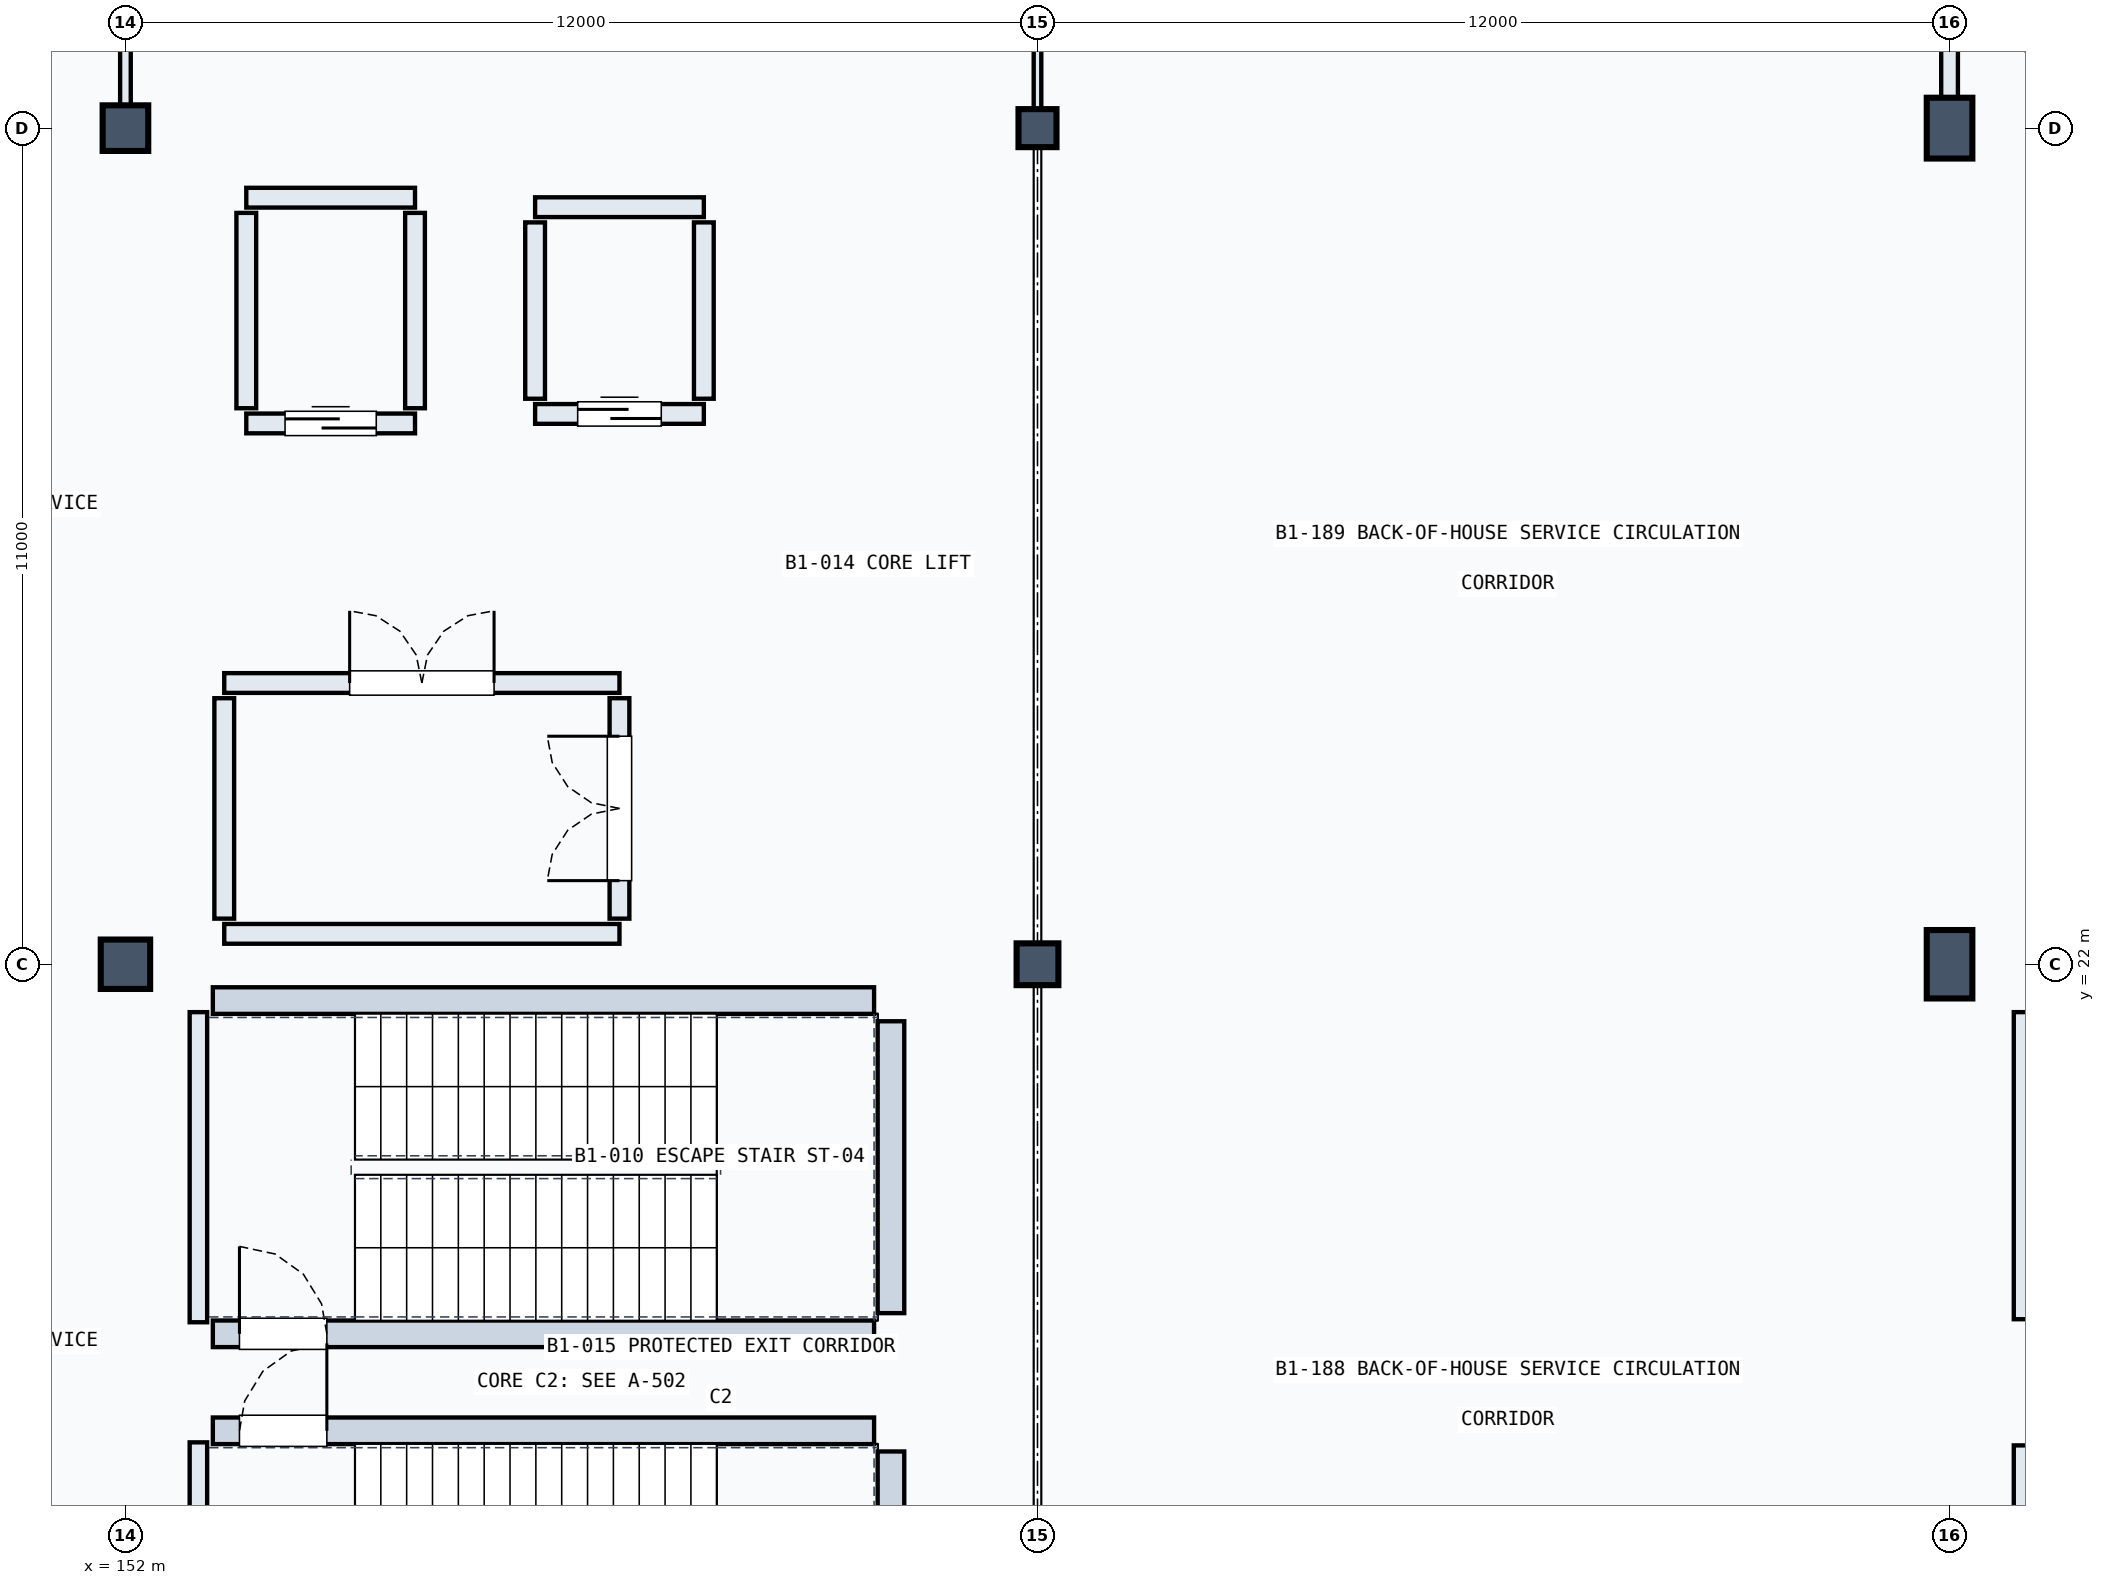
"""IFC4 building model, lengths in metres.
Left out: names, types, materials, properties, quantities, classifications, styles, units other than length and angle.
Written with IfcOpenShell. Run it as: python <this file> out.ifc"""

import sys

from ifc_helpers import new_model, si_unit, direction, frame, frame_2d, origin, origin_2d, place, context, subcontext, project, spatial, rectangle, extrude, element, fill, save


model = new_model("IFC4")
c1 = context("Model", 3, precision=1e-05, world=origin(), true_north=direction((0.0, 1.0)))
c2 = subcontext(c1, "Body", "Model", "MODEL_VIEW")
j1 = project(units=[si_unit("LENGTHUNIT", "METRE"), si_unit("PLANEANGLEUNIT", "RADIAN")], contexts=[c1])
p1 = place(None, origin())
s1 = spatial("IfcSite", under=j1, at=p1, CompositionType="ELEMENT")
p2 = place(p1, origin())
s2 = spatial("IfcBuilding", under=s1, at=p2, CompositionType="ELEMENT")
p3 = place(p2, frame((0.0, 0.0, -5.4)))
s3 = spatial("IfcBuildingStorey", under=s2, at=p3, CompositionType="ELEMENT", Elevation=-5.4)
p4 = place(p3, frame((152.0, 22.0, 0.0), z_axis=(0.0, 0.0, 1.0), x_axis=(1.0, 0.0, 0.0)))
e1 = element("IfcColumn", 1, at=p4, inside=s3, PredefinedType="COLUMN", context=c2, shape_type="SweptSolid", body=[
    extrude(rectangle(XDim=0.65, YDim=0.65, at=origin_2d()), origin(), (0.0, 0.0, 1.0), 5.4),
])
p5 = place(p3, frame((152.0, 33.0, 0.0), z_axis=(0.0, 0.0, 1.0), x_axis=(1.0, 0.0, 0.0)))
e2 = element("IfcColumn", 2, at=p5, inside=s3, PredefinedType="COLUMN", context=c2, shape_type="SweptSolid", body=[
    extrude(rectangle(XDim=0.6, YDim=0.6, at=origin_2d()), origin(), (0.0, 0.0, 1.0), 5.4),
])
p6 = place(p3, frame((164.0, 22.0, 0.0), z_axis=(0.0, 0.0, 1.0), x_axis=(1.0, 0.0, 0.0)))
e3 = element("IfcColumn", 3, at=p6, inside=s3, PredefinedType="COLUMN", context=c2, shape_type="SweptSolid", body=[
    extrude(rectangle(XDim=0.55, YDim=0.55, at=origin_2d()), origin(), (0.0, 0.0, 1.0), 5.4),
])
p7 = place(p3, frame((164.0, 33.0, 0.0), z_axis=(0.0, 0.0, 1.0), x_axis=(1.0, 0.0, 0.0)))
e4 = element("IfcColumn", 4, at=p7, inside=s3, PredefinedType="COLUMN", context=c2, shape_type="SweptSolid", body=[
    extrude(rectangle(XDim=0.5, YDim=0.5, at=origin_2d()), origin(), (0.0, 0.0, 1.0), 5.4),
])
p8 = place(p3, frame((176.0, 22.0, 0.0), z_axis=(0.0, 0.0, 1.0), x_axis=(1.0, 0.0, 0.0)))
e5 = element("IfcColumn", 5, at=p8, inside=s3, PredefinedType="COLUMN", context=c2, shape_type="SweptSolid", body=[
    extrude(rectangle(XDim=0.6, YDim=0.9, at=origin_2d()), origin(), (0.0, 0.0, 1.0), 5.4),
])
p9 = place(p3, frame((176.0, 33.0, 0.0), z_axis=(0.0, 0.0, 1.0), x_axis=(1.0, 0.0, 0.0)))
e6 = element("IfcColumn", 6, at=p9, inside=s3, PredefinedType="COLUMN", context=c2, shape_type="SweptSolid", body=[
    extrude(rectangle(XDim=0.6, YDim=0.8, at=origin_2d()), origin(), (0.0, 0.0, 1.0), 5.4),
])
p10 = place(p3, frame((152.96, 11.63, 0.0), z_axis=(0.0, 0.0, 1.0), x_axis=(0.0, 1.0, 0.0)))
e7 = element("IfcWall", 7, at=p10, inside=s3, PredefinedType="SOLIDWALL", context=c2, shape_type="SweptSolid", body=[
    extrude(rectangle(XDim=4.08, YDim=0.23, at=frame_2d((2.04, 0.0))), origin(), (0.0, 0.0, 1.0), 5.04),
])
p11 = place(p3, frame((162.072, 11.05, 0.0), z_axis=(0.0, 0.0, 1.0), x_axis=(0.0, 1.0, 0.0)))
e8 = element("IfcWall", 8, at=p11, inside=s3, PredefinedType="SOLIDWALL", context=c2, shape_type="SweptSolid", body=[
    extrude(rectangle(XDim=4.54, YDim=0.35, at=frame_2d((2.27, 0.0))), origin(), (0.0, 0.0, 1.0), 5.04),
])
p12 = place(p3, frame((153.15, 15.862, 0.0), z_axis=(0.0, 0.0, 1.0), x_axis=(1.0, 0.0, 0.0)))
e9 = element("IfcWall", 9, at=p12, inside=s3, PredefinedType="SOLIDWALL", context=c2, shape_type="SweptSolid", body=[
    extrude(rectangle(XDim=8.7, YDim=0.35, at=frame_2d((4.35, 0.0))), origin(), (0.0, 0.0, 1.0), 5.04),
])
p13 = place(p12, frame((0.35, 0.0, 0.0)))
e10 = element("IfcOpeningElement", 10, at=p13, cuts=e9, PredefinedType="OPENING", context=c2, shape_type="SweptSolid", body=[
    extrude(rectangle(XDim=1.15, YDim=2.2, at=frame_2d((0.575, 1.1))), frame((0.0, 0.185, 0.0), z_axis=(0.0, -1.0, 0.0), x_axis=(1.0, 0.0, 0.0)), (0.0, 0.0, 1.0), 0.37),
])
p14 = place(p3, frame((152.96, 17.29, 0.0), z_axis=(0.0, 0.0, 1.0), x_axis=(0.0, 1.0, 0.0)))
e11 = element("IfcWall", 11, at=p14, inside=s3, PredefinedType="SOLIDWALL", context=c2, shape_type="SweptSolid", body=[
    extrude(rectangle(XDim=4.08, YDim=0.23, at=frame_2d((2.04, 0.0))), origin(), (0.0, 0.0, 1.0), 5.04),
])
p15 = place(p3, frame((162.072, 17.41, 0.0), z_axis=(0.0, 0.0, 1.0), x_axis=(0.0, 1.0, 0.0)))
e12 = element("IfcWall", 12, at=p15, inside=s3, PredefinedType="SOLIDWALL", context=c2, shape_type="SweptSolid", body=[
    extrude(rectangle(XDim=3.84, YDim=0.35, at=frame_2d((1.92, 0.0))), origin(), (0.0, 0.0, 1.0), 5.04),
])
p16 = place(p3, frame((153.15, 17.138, 0.0), z_axis=(0.0, 0.0, 1.0), x_axis=(1.0, 0.0, 0.0)))
e13 = element("IfcWall", 13, at=p16, inside=s3, PredefinedType="SOLIDWALL", context=c2, shape_type="SweptSolid", body=[
    extrude(rectangle(XDim=8.7, YDim=0.35, at=frame_2d((4.35, 0.0))), origin(), (0.0, 0.0, 1.0), 5.04),
])
p17 = place(p16, frame((0.35, 0.0, 0.0)))
e14 = element("IfcOpeningElement", 14, at=p17, cuts=e13, PredefinedType="OPENING", context=c2, shape_type="SweptSolid", body=[
    extrude(rectangle(XDim=1.15, YDim=2.2, at=frame_2d((0.575, 1.1))), frame((0.0, 0.185, 0.0), z_axis=(0.0, -1.0, 0.0), x_axis=(1.0, 0.0, 0.0)), (0.0, 0.0, 1.0), 0.37),
])
p18 = place(p3, frame((153.15, 21.522, 0.0), z_axis=(0.0, 0.0, 1.0), x_axis=(1.0, 0.0, 0.0)))
e15 = element("IfcWall", 15, at=p18, inside=s3, PredefinedType="SOLIDWALL", context=c2, shape_type="SweptSolid", body=[
    extrude(rectangle(XDim=8.7, YDim=0.35, at=frame_2d((4.35, 0.0))), origin(), (0.0, 0.0, 1.0), 5.04),
])
p19 = place(p3, frame((153.59, 29.115, 0.0), z_axis=(0.0, 0.0, 1.0), x_axis=(1.0, 0.0, 0.0)))
e16 = element("IfcWall", 16, at=p19, inside=s3, PredefinedType="SOLIDWALL", context=c2, shape_type="SweptSolid", body=[
    extrude(rectangle(XDim=2.22, YDim=0.26, at=frame_2d((1.11, 0.0))), origin(), (0.0, 0.0, 1.0), 5.04),
])
p20 = place(p19, frame((0.51, 0.0, 0.0)))
e17 = element("IfcOpeningElement", 17, at=p20, cuts=e16, PredefinedType="OPENING", context=c2, shape_type="SweptSolid", body=[
    extrude(rectangle(XDim=1.2, YDim=2.2, at=frame_2d((0.6, 1.1))), frame((0.0, 0.14, 0.0), z_axis=(0.0, -1.0, 0.0), x_axis=(1.0, 0.0, 0.0)), (0.0, 0.0, 1.0), 0.28),
])
p21 = place(p3, frame((153.59, 32.085, 0.0), z_axis=(0.0, 0.0, 1.0), x_axis=(1.0, 0.0, 0.0)))
e18 = element("IfcWall", 18, at=p21, inside=s3, PredefinedType="SOLIDWALL", context=c2, shape_type="SweptSolid", body=[
    extrude(rectangle(XDim=2.22, YDim=0.26, at=frame_2d((1.11, 0.0))), origin(), (0.0, 0.0, 1.0), 5.04),
])
for number, where, z_axis, x_axis in (
    (19, (153.59, 29.315, 0.0), (0.0, 0.0, 1.0), (0.0, 1.0, 0.0)),
    (20, (155.81, 29.315, 0.0), (0.0, 0.0, 1.0), (0.0, 1.0, 0.0)),
):
    element("IfcWall", number, at=place(p3, frame(where, z_axis=z_axis, x_axis=x_axis)), inside=s3, PredefinedType="SOLIDWALL", context=c2, shape_type="SweptSolid", body=[
        extrude(rectangle(XDim=2.57, YDim=0.26, at=frame_2d((1.285, 0.0))), origin(), (0.0, 0.0, 1.0), 5.04),
    ])
p22 = place(p3, frame((157.39, 29.24, 0.0), z_axis=(0.0, 0.0, 1.0), x_axis=(1.0, 0.0, 0.0)))
e21 = element("IfcWall", 21, at=p22, inside=s3, PredefinedType="SOLIDWALL", context=c2, shape_type="SweptSolid", body=[
    extrude(rectangle(XDim=2.22, YDim=0.26, at=frame_2d((1.11, 0.0))), origin(), (0.0, 0.0, 1.0), 5.04),
])
p23 = place(p22, frame((0.56, 0.0, 0.0)))
e22 = element("IfcOpeningElement", 22, at=p23, cuts=e21, PredefinedType="OPENING", context=c2, shape_type="SweptSolid", body=[
    extrude(rectangle(XDim=1.1, YDim=2.15, at=frame_2d((0.55, 1.075))), frame((0.0, 0.14, 0.0), z_axis=(0.0, -1.0, 0.0), x_axis=(1.0, 0.0, 0.0)), (0.0, 0.0, 1.0), 0.28),
])
p24 = place(p3, frame((157.39, 31.96, 0.0), z_axis=(0.0, 0.0, 1.0), x_axis=(1.0, 0.0, 0.0)))
e23 = element("IfcWall", 23, at=p24, inside=s3, PredefinedType="SOLIDWALL", context=c2, shape_type="SweptSolid", body=[
    extrude(rectangle(XDim=2.22, YDim=0.26, at=frame_2d((1.11, 0.0))), origin(), (0.0, 0.0, 1.0), 5.04),
])
for number, where, z_axis, x_axis in (
    (24, (157.39, 29.44, 0.0), (0.0, 0.0, 1.0), (0.0, 1.0, 0.0)),
    (25, (159.61, 29.44, 0.0), (0.0, 0.0, 1.0), (0.0, 1.0, 0.0)),
):
    element("IfcWall", number, at=place(p3, frame(where, z_axis=z_axis, x_axis=x_axis)), inside=s3, PredefinedType="SOLIDWALL", context=c2, shape_type="SweptSolid", body=[
        extrude(rectangle(XDim=2.32, YDim=0.26, at=frame_2d((1.16, 0.0))), origin(), (0.0, 0.0, 1.0), 5.04),
    ])
p25 = place(p3, frame((153.3, 25.7, 0.0), z_axis=(0.0, 0.0, 1.0), x_axis=(1.0, 0.0, 0.0)))
e26 = element("IfcWall", 26, at=p25, inside=s3, PredefinedType="SOLIDWALL", context=c2, shape_type="SweptSolid", body=[
    extrude(rectangle(XDim=5.2, YDim=0.26, at=frame_2d((2.6, 0.0))), origin(), (0.0, 0.0, 1.0), 5.04),
])
p26 = place(p25, frame((1.65, 0.0, 0.0)))
e27 = element("IfcOpeningElement", 27, at=p26, cuts=e26, PredefinedType="OPENING", context=c2, shape_type="SweptSolid", body=[
    extrude(rectangle(XDim=1.9, YDim=2.2, at=frame_2d((0.95, 1.1))), frame((0.0, 0.14, 0.0), z_axis=(0.0, -1.0, 0.0), x_axis=(1.0, 0.0, 0.0)), (0.0, 0.0, 1.0), 0.28),
])
p27 = place(p3, frame((153.3, 22.4, 0.0), z_axis=(0.0, 0.0, 1.0), x_axis=(1.0, 0.0, 0.0)))
e28 = element("IfcWall", 28, at=p27, inside=s3, PredefinedType="SOLIDWALL", context=c2, shape_type="SweptSolid", body=[
    extrude(rectangle(XDim=5.2, YDim=0.26, at=frame_2d((2.6, 0.0))), origin(), (0.0, 0.0, 1.0), 4.43),
])
p28 = place(p3, frame((153.3, 22.6, 0.0), z_axis=(0.0, 0.0, 1.0), x_axis=(0.0, 1.0, 0.0)))
e29 = element("IfcWall", 29, at=p28, inside=s3, PredefinedType="SOLIDWALL", context=c2, shape_type="SweptSolid", body=[
    extrude(rectangle(XDim=2.9, YDim=0.26, at=frame_2d((1.45, 0.0))), origin(), (0.0, 0.0, 1.0), 5.04),
])
p29 = place(p3, frame((158.5, 22.6, 0.0), z_axis=(0.0, 0.0, 1.0), x_axis=(0.0, 1.0, 0.0)))
e30 = element("IfcWall", 30, at=p29, inside=s3, PredefinedType="SOLIDWALL", context=c2, shape_type="SweptSolid", body=[
    extrude(rectangle(XDim=2.9, YDim=0.26, at=frame_2d((1.45, 0.0))), origin(), (0.0, 0.0, 1.0), 5.04),
])
p30 = place(p29, frame((0.5, 0.0, 0.0)))
e31 = element("IfcOpeningElement", 31, at=p30, cuts=e30, PredefinedType="OPENING", context=c2, shape_type="SweptSolid", body=[
    extrude(rectangle(XDim=1.9, YDim=2.2, at=frame_2d((0.95, 1.1))), frame((0.0, 0.14, 0.0), z_axis=(0.0, -1.0, 0.0), x_axis=(1.0, 0.0, 0.0)), (0.0, 0.0, 1.0), 0.28),
])
for number, where, z_axis, x_axis in (
    (32, (176.96, 11.63, 0.0), (0.0, 0.0, 1.0), (0.0, 1.0, 0.0)),
    (33, (176.96, 17.33, 0.0), (0.0, 0.0, 1.0), (0.0, 1.0, 0.0)),
):
    element("IfcWall", number, at=place(p3, frame(where, z_axis=z_axis, x_axis=x_axis)), inside=s3, PredefinedType="SOLIDWALL", context=c2, shape_type="SweptSolid", body=[
        extrude(rectangle(XDim=4.04, YDim=0.23, at=frame_2d((2.02, 0.0))), origin(), (0.0, 0.0, 1.0), 5.04),
    ])
p31 = place(p3, frame((152.0, 33.22, 0.0), z_axis=(0.0, 0.0, 1.0), x_axis=(0.0, 1.0, 0.0)))
e34 = element("IfcWall", 34, at=p31, inside=s3, PredefinedType="PARTITIONING", context=c2, shape_type="SweptSolid", body=[
    extrude(rectangle(XDim=10.56, YDim=0.14, at=frame_2d((5.28, 0.0))), origin(), (0.0, 0.0, 1.0), 4.346),
])
p32 = place(p31, frame((4.61, 0.0, 0.0)))
e35 = element("IfcOpeningElement", 35, at=p32, cuts=e34, PredefinedType="OPENING", context=c2, shape_type="SweptSolid", body=[
    extrude(rectangle(XDim=1.34, YDim=2.15, at=frame_2d((0.67, 1.075))), frame((0.0, 0.08, 0.0), z_axis=(0.0, -1.0, 0.0), x_axis=(1.0, 0.0, 0.0)), (0.0, 0.0, 1.0), 0.16),
])
p33 = place(p3, frame((164.0, 33.21, 0.0), z_axis=(0.0, 0.0, 1.0), x_axis=(0.0, 1.0, 0.0)))
e36 = element("IfcWall", 36, at=p33, inside=s3, PredefinedType="PARTITIONING", context=c2, shape_type="SweptSolid", body=[
    extrude(rectangle(XDim=10.57, YDim=0.1, at=frame_2d((5.285, 0.0))), origin(), (0.0, 0.0, 1.0), 4.41),
])
p34 = place(p3, frame((176.0, 33.22, 0.0), z_axis=(0.0, 0.0, 1.0), x_axis=(0.0, 1.0, 0.0)))
e37 = element("IfcWall", 37, at=p34, inside=s3, PredefinedType="PARTITIONING", context=c2, shape_type="SweptSolid", body=[
    extrude(rectangle(XDim=10.56, YDim=0.22, at=frame_2d((5.28, 0.0))), origin(), (0.0, 0.0, 1.0), 4.08),
])
p35 = place(p34, frame((4.77, 0.0, 0.0)))
e38 = element("IfcOpeningElement", 38, at=p35, cuts=e37, PredefinedType="OPENING", context=c2, shape_type="SweptSolid", body=[
    extrude(rectangle(XDim=1.02, YDim=2.25, at=frame_2d((0.51, 1.125))), frame((0.0, 0.12, 0.0), z_axis=(0.0, -1.0, 0.0), x_axis=(1.0, 0.0, 0.0)), (0.0, 0.0, 1.0), 0.24),
])
p36 = place(p13, origin())
e39 = element("IfcDoor", 39, at=p36, inside=s3, OperationType="SINGLE_SWING_RIGHT", PredefinedType="DOOR", context=c2, shape_type="SweptSolid", body=[
    extrude(rectangle(XDim=1.15, YDim=2.2, at=frame_2d((0.575, 1.1))), frame((0.0, 0.025, 0.0), z_axis=(0.0, -1.0, 0.0), x_axis=(1.0, 0.0, 0.0)), (0.0, 0.0, 1.0), 0.05),
])
fill(e10, e39)
p37 = place(p17, origin())
e40 = element("IfcDoor", 40, at=p37, inside=s3, OperationType="SINGLE_SWING_LEFT", PredefinedType="DOOR", context=c2, shape_type="SweptSolid", body=[
    extrude(rectangle(XDim=1.15, YDim=2.2, at=frame_2d((0.575, 1.1))), frame((0.0, 0.025, 0.0), z_axis=(0.0, -1.0, 0.0), x_axis=(1.0, 0.0, 0.0)), (0.0, 0.0, 1.0), 0.05),
])
fill(e14, e40)
p38 = place(p20, origin())
e41 = element("IfcDoor", 41, at=p38, inside=s3, OperationType="SLIDING_TO_LEFT", PredefinedType="DOOR", context=c2, shape_type="SweptSolid", body=[
    extrude(rectangle(XDim=1.2, YDim=2.2, at=frame_2d((0.6, 1.1))), frame((0.0, 0.025, 0.0), z_axis=(0.0, -1.0, 0.0), x_axis=(1.0, 0.0, 0.0)), (0.0, 0.0, 1.0), 0.05),
])
fill(e17, e41)
p39 = place(p23, origin())
e42 = element("IfcDoor", 42, at=p39, inside=s3, OperationType="SLIDING_TO_LEFT", PredefinedType="DOOR", context=c2, shape_type="SweptSolid", body=[
    extrude(rectangle(XDim=1.1, YDim=2.15, at=frame_2d((0.55, 1.075))), frame((0.0, 0.025, 0.0), z_axis=(0.0, -1.0, 0.0), x_axis=(1.0, 0.0, 0.0)), (0.0, 0.0, 1.0), 0.05),
])
fill(e22, e42)
p40 = place(p26, origin())
e43 = element("IfcDoor", 43, at=p40, inside=s3, OperationType="DOUBLE_DOOR_SINGLE_SWING", PredefinedType="DOOR", context=c2, shape_type="SweptSolid", body=[
    extrude(rectangle(XDim=1.9, YDim=2.2, at=frame_2d((0.95, 1.1))), frame((0.0, 0.025, 0.0), z_axis=(0.0, -1.0, 0.0), x_axis=(1.0, 0.0, 0.0)), (0.0, 0.0, 1.0), 0.05),
])
fill(e27, e43)
p41 = place(p30, origin())
e44 = element("IfcDoor", 44, at=p41, inside=s3, OperationType="DOUBLE_DOOR_SINGLE_SWING", PredefinedType="DOOR", context=c2, shape_type="SweptSolid", body=[
    extrude(rectangle(XDim=1.9, YDim=2.2, at=frame_2d((0.95, 1.1))), frame((0.0, 0.025, 0.0), z_axis=(0.0, -1.0, 0.0), x_axis=(1.0, 0.0, 0.0)), (0.0, 0.0, 1.0), 0.05),
])
fill(e31, e44)
save(model, sys.argv[1])
